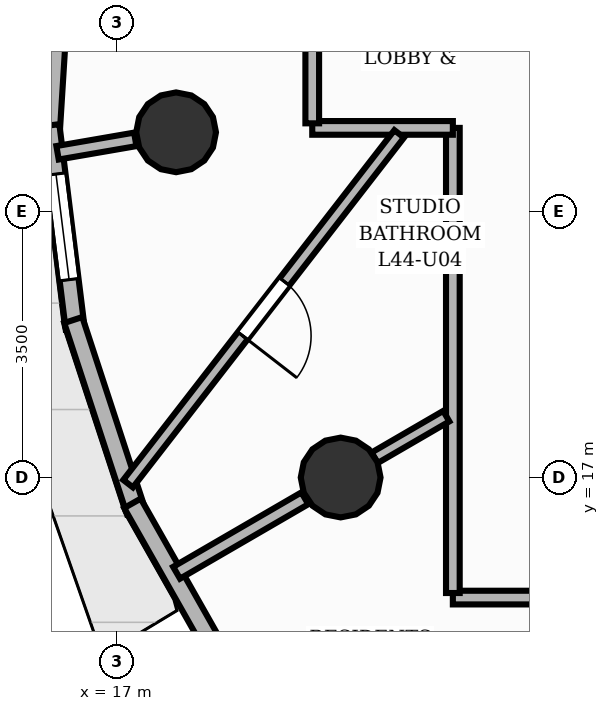
"""IFC4 building model, lengths in metres.
Left out: names, types, materials, properties, quantities, classifications, styles, units other than length and angle.
Written with IfcOpenShell. Run it as: python <this file> out.ifc"""

import sys

from ifc_helpers import new_model, si_unit, direction, frame, frame_2d, origin, origin_2d, place, context, subcontext, project, spatial, rectangle, circle, extrude, element, fill, save


model = new_model("IFC4")
c1 = context("Model", 3, precision=1e-05, world=origin(), true_north=direction((0.0, 1.0)))
c2 = subcontext(c1, "Body", "Model", "MODEL_VIEW")
j1 = project(units=[si_unit("LENGTHUNIT", "METRE"), si_unit("PLANEANGLEUNIT", "RADIAN")], contexts=[c1])
p1 = place(None, origin())
s1 = spatial("IfcSite", under=j1, at=p1, CompositionType="ELEMENT")
p2 = place(p1, origin())
s2 = spatial("IfcBuilding", under=s1, at=p2, CompositionType="ELEMENT")
p3 = place(p2, frame((0.0, 0.0, 148.96)))
s3 = spatial("IfcBuildingStorey", under=s2, at=p3, CompositionType="ELEMENT", Elevation=148.96)
for number, where, z_axis, x_axis in (
    (1, (17.779, 21.542, 0.0), (0.0, 0.0, 1.0), (1.0, 0.0, 0.0)),
    (2, (19.944, 17.0, 0.0), (0.0, 0.0, 1.0), (1.0, 0.0, 0.0)),
):
    element("IfcColumn", number, at=place(p3, frame(where, z_axis=z_axis, x_axis=x_axis)), inside=s3, PredefinedType="COLUMN", context=c2, shape_type="SweptSolid", body=[
        extrude(circle(Radius=0.525, at=origin_2d()), origin(), (0.0, 0.0, 1.0), 3.2),
    ])
p4 = place(p3, frame((16.122, 21.521, 0.0), z_axis=(0.0, 0.0, 1.0), x_axis=(0.062278868317, 0.998058787127, 0.0)))
e3 = element("IfcWall", 3, at=p4, inside=s3, PredefinedType="SOLIDWALL", context=c2, shape_type="SweptSolid", body=[
    extrude(rectangle(XDim=2.752, YDim=0.25, at=frame_2d((1.376, 0.0))), origin(), (0.0, 0.0, 1.0), 2.96),
])
p5 = place(p3, frame((16.451, 18.961, 0.0), z_axis=(0.0, 0.0, 1.0), x_axis=(-0.123197890413, 0.992382123881, 0.0)))
e4 = element("IfcWall", 4, at=p5, inside=s3, PredefinedType="SOLIDWALL", context=c2, shape_type="SweptSolid", body=[
    extrude(rectangle(XDim=2.693, YDim=0.25, at=frame_2d((1.347, 0.0))), origin(), (0.0, 0.0, 1.0), 2.96),
])
p6 = place(p5, frame((0.647, 0.0, 0.85)))
e5 = element("IfcOpeningElement", 5, at=p6, cuts=e4, PredefinedType="OPENING", context=c2, shape_type="SweptSolid", body=[
    extrude(rectangle(XDim=1.4, YDim=1.45, at=frame_2d((0.7, 0.725))), frame((0.0, 0.135, 0.0), z_axis=(0.0, -1.0, 0.0), x_axis=(1.0, 0.0, 0.0)), (0.0, 0.0, 1.0), 0.27),
])
p7 = place(p3, frame((17.251, 16.556, 0.0), z_axis=(0.0, 0.0, 1.0), x_axis=(-0.311522010952, 0.950238936633, 0.0)))
e6 = element("IfcWall", 6, at=p7, inside=s3, PredefinedType="SOLIDWALL", context=c2, shape_type="SweptSolid", body=[
    extrude(rectangle(XDim=2.648, YDim=0.25, at=frame_2d((1.324, 0.0))), origin(), (0.0, 0.0, 1.0), 2.96),
])
p8 = place(p3, frame((18.498, 14.377, 0.0), z_axis=(0.0, 0.0, 1.0), x_axis=(-0.492909281161, 0.870080709214, 0.0)))
e7 = element("IfcWall", 7, at=p8, inside=s3, PredefinedType="SOLIDWALL", context=c2, shape_type="SweptSolid", body=[
    extrude(rectangle(XDim=2.624, YDim=0.25, at=frame_2d((1.312, 0.0))), origin(), (0.0, 0.0, 1.0), 2.96),
])
p9 = place(p3, frame((17.242, 21.449, 0.0), z_axis=(0.0, 0.0, 1.0), x_axis=(-0.985390767806, -0.170308645474, 0.0)))
e8 = element("IfcWall", 8, at=p9, inside=s3, PredefinedType="PARTITIONING", context=c2, shape_type="SweptSolid", body=[
    extrude(rectangle(XDim=1.038, YDim=0.18, at=frame_2d((0.519, 0.0))), origin(), (0.0, 0.0, 1.0), 2.336),
])
p10 = place(p3, frame((19.472, 16.726, 0.0), z_axis=(0.0, 0.0, 1.0), x_axis=(-0.864802971131, -0.502111363268, 0.0)))
e9 = element("IfcWall", 9, at=p10, inside=s3, PredefinedType="PARTITIONING", context=c2, shape_type="SweptSolid", body=[
    extrude(rectangle(XDim=1.951, YDim=0.18, at=frame_2d((0.975, 0.0))), origin(), (0.0, 0.0, 1.0), 2.336),
])
p11 = place(p3, frame((39.08, 15.42, 0.0), z_axis=(0.0, 0.0, 1.0), x_axis=(-1.0, 0.0, 0.0)))
e10 = element("IfcWall", 10, at=p11, inside=s3, PredefinedType="PARTITIONING", context=c2, shape_type="SweptSolid", body=[
    extrude(rectangle(XDim=17.66, YDim=0.18, at=frame_2d((8.83, 0.0))), origin(), (0.0, 0.0, 1.0), 2.955),
])
p12 = place(p11, frame((7.368, 0.0, 0.0)))
e11 = element("IfcOpeningElement", 11, at=p12, cuts=e10, PredefinedType="OPENING", context=c2, shape_type="SweptSolid", body=[
    extrude(rectangle(XDim=0.9, YDim=2.1, at=frame_2d((0.45, 1.05))), frame((0.0, 0.1, 0.0), z_axis=(0.0, -1.0, 0.0), x_axis=(1.0, 0.0, 0.0)), (0.0, 0.0, 1.0), 0.2),
])
p13 = place(p11, frame((10.224, 0.0, 0.0)))
e12 = element("IfcOpeningElement", 12, at=p13, cuts=e10, PredefinedType="OPENING", context=c2, shape_type="SweptSolid", body=[
    extrude(rectangle(XDim=0.9, YDim=2.1, at=frame_2d((0.45, 1.05))), frame((0.0, 0.1, 0.0), z_axis=(0.0, -1.0, 0.0), x_axis=(1.0, 0.0, 0.0)), (0.0, 0.0, 1.0), 0.2),
])
p14 = place(p11, frame((14.353, 0.0, 0.0)))
e13 = element("IfcOpeningElement", 13, at=p14, cuts=e10, PredefinedType="OPENING", context=c2, shape_type="SweptSolid", body=[
    extrude(rectangle(XDim=0.9, YDim=2.1, at=frame_2d((0.45, 1.05))), frame((0.0, 0.1, 0.0), z_axis=(0.0, -1.0, 0.0), x_axis=(1.0, 0.0, 0.0)), (0.0, 0.0, 1.0), 0.2),
])
p15 = place(p3, frame((21.42, 15.48, 0.0), z_axis=(0.0, 0.0, 1.0), x_axis=(0.0, 1.0, 0.0)))
e14 = element("IfcWall", 14, at=p15, inside=s3, PredefinedType="PARTITIONING", context=c2, shape_type="SweptSolid", body=[
    extrude(rectangle(XDim=6.12, YDim=0.18, at=frame_2d((3.06, 0.0))), origin(), (0.0, 0.0, 1.0), 2.955),
])
p16 = place(p3, frame((21.42, 21.6, 0.0), z_axis=(0.0, 0.0, 1.0), x_axis=(-1.0, 0.0, 0.0)))
e15 = element("IfcWall", 15, at=p16, inside=s3, PredefinedType="PARTITIONING", context=c2, shape_type="SweptSolid", body=[
    extrude(rectangle(XDim=1.85, YDim=0.18, at=frame_2d((0.925, 0.0))), origin(), (0.0, 0.0, 1.0), 2.336),
])
p17 = place(p3, frame((19.57, 21.66, 0.0), z_axis=(0.0, 0.0, 1.0), x_axis=(0.0, 1.0, 0.0)))
e16 = element("IfcWall", 16, at=p17, inside=s3, PredefinedType="PARTITIONING", context=c2, shape_type="SweptSolid", body=[
    extrude(rectangle(XDim=4.74, YDim=0.18, at=frame_2d((2.37, 0.0))), origin(), (0.0, 0.0, 1.0), 2.955),
])
p18 = place(p3, frame((20.391, 17.26, 0.0), z_axis=(0.0, 0.0, 1.0), x_axis=(0.864719901707, 0.50225440923, 0.0)))
e17 = element("IfcWall", 17, at=p18, inside=s3, PredefinedType="PLUMBINGWALL", context=c2, shape_type="SweptSolid", body=[
    extrude(rectangle(XDim=1.09, YDim=0.16, at=frame_2d((0.545, 0.0))), origin(), (0.0, 0.0, 1.0), 2.336),
])
p19 = place(p3, frame((20.714, 21.521, 0.0), z_axis=(0.0, 0.0, 1.0), x_axis=(-0.612572320399, -0.790414544578, 0.0)))
e18 = element("IfcWall", 18, at=p19, inside=s3, PredefinedType="PLUMBINGWALL", context=c2, shape_type="SweptSolid", body=[
    extrude(rectangle(XDim=5.822, YDim=0.16, at=frame_2d((2.911, 0.0))), origin(), (0.0, 0.0, 1.0), 2.955),
])
p20 = place(p19, frame((2.461, 0.0, 0.0)))
e19 = element("IfcOpeningElement", 19, at=p20, cuts=e18, PredefinedType="OPENING", context=c2, shape_type="SweptSolid", body=[
    extrude(rectangle(XDim=0.9, YDim=2.1, at=frame_2d((0.45, 1.05))), frame((0.0, 0.09, 0.0), z_axis=(0.0, -1.0, 0.0), x_axis=(1.0, 0.0, 0.0)), (0.0, 0.0, 1.0), 0.18),
])
p21 = place(p6, origin())
e20 = element("IfcWindow", 20, at=p21, inside=s3, PartitioningType="SINGLE_PANEL", PredefinedType="WINDOW", context=c2, shape_type="SweptSolid", body=[
    extrude(rectangle(XDim=1.4, YDim=1.45, at=frame_2d((0.7, 0.725))), frame((0.0, 0.03, 0.0), z_axis=(0.0, -1.0, 0.0), x_axis=(1.0, 0.0, 0.0)), (0.0, 0.0, 1.0), 0.06),
])
fill(e5, e20)
p22 = place(p20, origin())
e21 = element("IfcDoor", 21, at=p22, inside=s3, OperationType="SINGLE_SWING_RIGHT", PredefinedType="DOOR", context=c2, shape_type="SweptSolid", body=[
    extrude(rectangle(XDim=0.9, YDim=2.1, at=frame_2d((0.45, 1.05))), frame((0.0, 0.025, 0.0), z_axis=(0.0, -1.0, 0.0), x_axis=(1.0, 0.0, 0.0)), (0.0, 0.0, 1.0), 0.05),
])
fill(e19, e21)
save(model, sys.argv[1])
